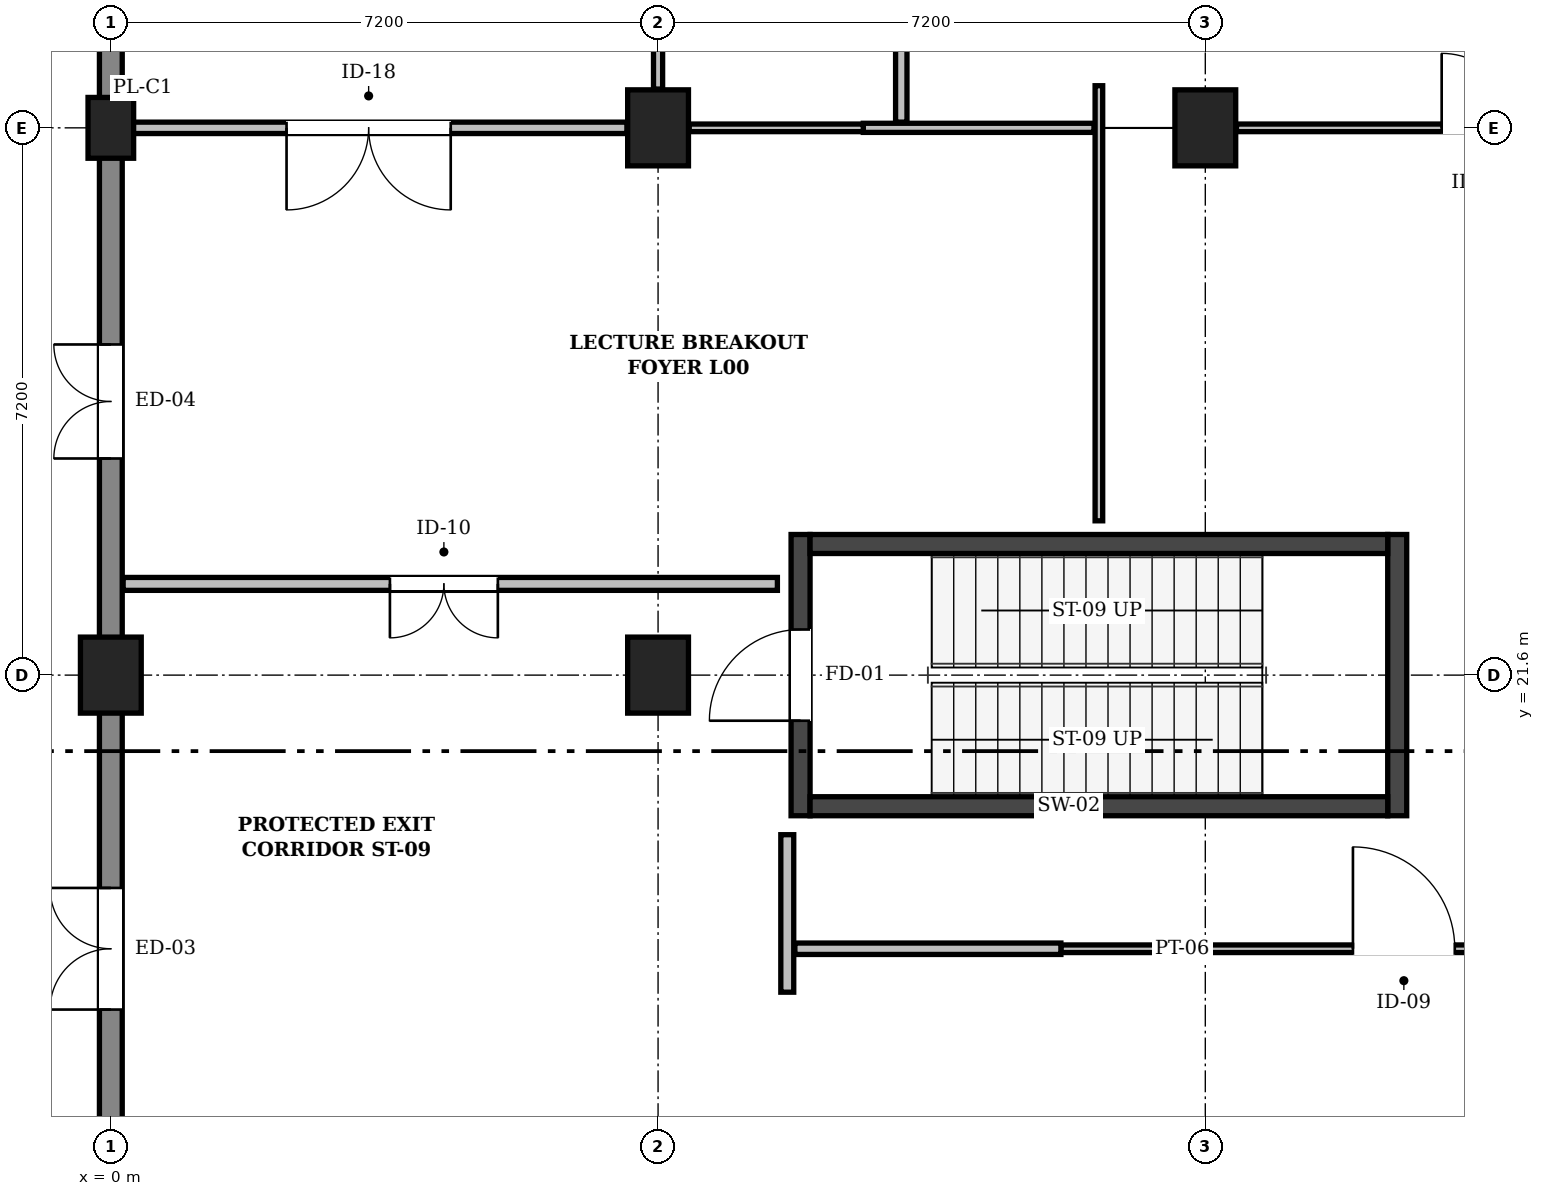
"""IFC4 building model, lengths in metres.
Left out: names, types, materials, properties, quantities, classifications, styles, units other than length and angle.
Written with IfcOpenShell. Run it as: python <this file> out.ifc"""

import sys

from ifc_helpers import new_model, si_unit, direction, frame, frame_2d, origin, origin_2d, place, context, subcontext, project, spatial, rectangle, extrude, element, fill, save


model = new_model("IFC4")
c1 = context("Model", 3, precision=1e-05, world=origin(), true_north=direction((0.0, 1.0)))
c2 = subcontext(c1, "Body", "Model", "MODEL_VIEW")
j1 = project(units=[si_unit("LENGTHUNIT", "METRE"), si_unit("PLANEANGLEUNIT", "RADIAN")], contexts=[c1])
p1 = place(None, origin())
s1 = spatial("IfcSite", under=j1, at=p1, CompositionType="ELEMENT")
p2 = place(p1, origin())
s2 = spatial("IfcBuilding", under=s1, at=p2, CompositionType="ELEMENT")
p3 = place(p2, origin())
s3 = spatial("IfcBuildingStorey", under=s2, at=p3, CompositionType="ELEMENT", Elevation=0.0)
p4 = place(p3, frame((0.0, 21.6, 0.0), z_axis=(0.0, 0.0, 1.0), x_axis=(1.0, 0.0, 0.0)))
e1 = element("IfcColumn", 1, at=p4, inside=s3, PredefinedType="COLUMN", context=c2, shape_type="SweptSolid", body=[
    extrude(rectangle(XDim=0.8, YDim=1.0, at=origin_2d()), origin(), (0.0, 0.0, 1.0), 4.8),
])
p5 = place(p3, frame((0.0, 28.8, 0.0), z_axis=(0.0, 0.062753387879, 0.99802906386), x_axis=(-1.0, 0.0, 0.0)))
e2 = element("IfcColumn", 2, at=p5, inside=s3, PredefinedType="PILASTER", context=c2, shape_type="SweptSolid", body=[
    extrude(rectangle(XDim=0.6, YDim=0.8, at=origin_2d()), origin(), (0.0, 0.0, 1.0), 4.781),
])
for number, where, z_axis, x_axis in (
    (3, (7.2, 21.6, 0.0), (0.0, 0.0, 1.0), (1.0, 0.0, 0.0)),
    (4, (7.2, 28.8, 0.0), (0.0, 0.0, 1.0), (1.0, 0.0, 0.0)),
    (5, (14.4, 28.8, 0.0), (0.0, 0.0, 1.0), (1.0, 0.0, 0.0)),
):
    element("IfcColumn", number, at=place(p3, frame(where, z_axis=z_axis, x_axis=x_axis)), inside=s3, PredefinedType="COLUMN", context=c2, shape_type="SweptSolid", body=[
        extrude(rectangle(XDim=0.8, YDim=1.0, at=origin_2d()), origin(), (0.0, 0.0, 1.0), 4.8),
    ])
p6 = place(p3, frame((0.0, 14.4, 0.0), z_axis=(0.0, 0.0, 1.0), x_axis=(0.0, 1.0, 0.0)))
e6 = element("IfcWall", 6, at=p6, inside=s3, PredefinedType="SOLIDWALL", context=c2, shape_type="SweptSolid", body=[
    extrude(rectangle(XDim=7.2, YDim=0.3, at=frame_2d((3.6, 0.0))), origin(), (0.0, 0.0, 1.0), 4.52),
])
p7 = place(p6, frame((2.8, 0.0, 0.0)))
e7 = element("IfcOpeningElement", 7, at=p7, cuts=e6, PredefinedType="OPENING", context=c2, shape_type="SweptSolid", body=[
    extrude(rectangle(XDim=1.6, YDim=2.2, at=frame_2d((0.8, 1.1))), frame((0.0, 0.162, 0.0), z_axis=(0.0, -1.0, 0.0), x_axis=(1.0, 0.0, 0.0)), (0.0, 0.0, 1.0), 0.324),
])
p8 = place(p3, frame((0.0, 21.6, 0.0), z_axis=(0.0, 0.0, 1.0), x_axis=(0.0, 1.0, 0.0)))
e8 = element("IfcWall", 8, at=p8, inside=s3, PredefinedType="SOLIDWALL", context=c2, shape_type="SweptSolid", body=[
    extrude(rectangle(XDim=7.2, YDim=0.3, at=frame_2d((3.6, 0.0))), origin(), (0.0, 0.0, 1.0), 4.52),
])
p9 = place(p8, frame((2.85, 0.0, 0.0)))
e9 = element("IfcOpeningElement", 9, at=p9, cuts=e8, PredefinedType="OPENING", context=c2, shape_type="SweptSolid", body=[
    extrude(rectangle(XDim=1.5, YDim=2.15, at=frame_2d((0.75, 1.075))), frame((0.0, 0.162, 0.0), z_axis=(0.0, -1.0, 0.0), x_axis=(1.0, 0.0, 0.0)), (0.0, 0.0, 1.0), 0.324),
])
p10 = place(p3, frame((0.0, 29.1, 0.0), z_axis=(0.0, 0.0, 1.0), x_axis=(0.0, 1.0, 0.0)))
e10 = element("IfcWall", 10, at=p10, inside=s3, PredefinedType="SOLIDWALL", context=c2, shape_type="SweptSolid", body=[
    extrude(rectangle(XDim=6.9, YDim=0.3, at=frame_2d((3.45, 0.0))), origin(), (0.0, 0.0, 1.0), 4.52),
])
p11 = place(p10, frame((2.75, 0.0, 0.0)))
e11 = element("IfcOpeningElement", 11, at=p11, cuts=e10, PredefinedType="OPENING", context=c2, shape_type="SweptSolid", body=[
    extrude(rectangle(XDim=1.4, YDim=2.15, at=frame_2d((0.7, 1.075))), frame((0.0, 0.162, 0.0), z_axis=(0.0, -1.0, 0.0), x_axis=(1.0, 0.0, 0.0)), (0.0, 0.0, 1.0), 0.324),
])
p12 = place(p3, frame((9.075, 19.75, 0.0), z_axis=(0.0, 0.0, 1.0), x_axis=(0.0, 1.0, 0.0)))
e12 = element("IfcWall", 12, at=p12, inside=s3, PredefinedType="SHEAR", context=c2, shape_type="SweptSolid", body=[
    extrude(rectangle(XDim=3.7, YDim=0.25, at=frame_2d((1.85, 0.0))), origin(), (0.0, 0.0, 1.0), 4.55),
])
p13 = place(p12, frame((1.25, 0.0, 0.0)))
e13 = element("IfcOpeningElement", 13, at=p13, cuts=e12, PredefinedType="OPENING", context=c2, shape_type="SweptSolid", body=[
    extrude(rectangle(XDim=1.2, YDim=2.15, at=frame_2d((0.6, 1.075))), frame((0.0, 0.137, 0.0), z_axis=(0.0, -1.0, 0.0), x_axis=(1.0, 0.0, 0.0)), (0.0, 0.0, 1.0), 0.274),
])
p14 = place(p3, frame((16.925, 19.75, 0.0), z_axis=(0.0, 0.0, 1.0), x_axis=(0.0, 1.0, 0.0)))
e14 = element("IfcWall", 14, at=p14, inside=s3, PredefinedType="SHEAR", context=c2, shape_type="SweptSolid", body=[
    extrude(rectangle(XDim=3.7, YDim=0.25, at=frame_2d((1.85, 0.0))), origin(), (0.0, 0.0, 1.0), 4.55),
])
for number, where, z_axis, x_axis in (
    (15, (9.2, 19.875, 0.0), (0.0, 0.0, 1.0), (1.0, 0.0, 0.0)),
    (16, (9.2, 23.325, 0.0), (0.0, 0.0, 1.0), (1.0, 0.0, 0.0)),
):
    element("IfcWall", number, at=place(p3, frame(where, z_axis=z_axis, x_axis=x_axis)), inside=s3, PredefinedType="SHEAR", context=c2, shape_type="SweptSolid", body=[
        extrude(rectangle(XDim=7.6, YDim=0.25, at=frame_2d((3.8, 0.0))), origin(), (0.0, 0.0, 1.0), 4.55),
    ])
p15 = place(p3, frame((0.162, 22.8, 0.0), z_axis=(0.0, 0.0, 1.0), x_axis=(1.0, 0.0, 0.0)))
e17 = element("IfcWall", 17, at=p15, inside=s3, PredefinedType="PARTITIONING", context=c2, shape_type="SweptSolid", body=[
    extrude(rectangle(XDim=8.608, YDim=0.17, at=frame_2d((4.304, 0.0))), origin(), (0.0, 0.0, 1.0), 4.46),
])
p16 = place(p15, frame((3.51, 0.0, 0.0)))
e18 = element("IfcOpeningElement", 18, at=p16, cuts=e17, PredefinedType="OPENING", context=c2, shape_type="SweptSolid", body=[
    extrude(rectangle(XDim=1.42, YDim=2.24, at=frame_2d((0.71, 1.12))), frame((0.0, 0.097, 0.0), z_axis=(0.0, -1.0, 0.0), x_axis=(1.0, 0.0, 0.0)), (0.0, 0.0, 1.0), 0.194),
])
p17 = place(p3, frame((8.9, 17.428, 0.0), z_axis=(0.0, 0.0, 1.0), x_axis=(0.0, 1.0, 0.0)))
e19 = element("IfcWall", 19, at=p17, inside=s3, PredefinedType="PARTITIONING", context=c2, shape_type="SweptSolid", body=[
    extrude(rectangle(XDim=2.072, YDim=0.17, at=frame_2d((1.036, 0.0))), origin(), (0.0, 0.0, 1.0), 4.46),
])
p18 = place(p3, frame((12.5, 18.0, 0.0), z_axis=(0.0, 0.0, 1.0), x_axis=(1.0, 0.0, 0.0)))
e20 = element("IfcWall", 20, at=p18, inside=s3, PredefinedType="PARTITIONING", context=c2, shape_type="SweptSolid", body=[
    extrude(rectangle(XDim=9.025, YDim=0.1, at=frame_2d((4.512, 0.0))), origin(), (0.0, 0.0, 1.0), 4.46),
])
p19 = place(p18, frame((3.843, 0.0, 0.0)))
e21 = element("IfcOpeningElement", 21, at=p19, cuts=e20, PredefinedType="OPENING", context=c2, shape_type="SweptSolid", body=[
    extrude(rectangle(XDim=1.34, YDim=2.24, at=frame_2d((0.67, 1.12))), frame((0.0, 0.062, 0.0), z_axis=(0.0, -1.0, 0.0), x_axis=(1.0, 0.0, 0.0)), (0.0, 0.0, 1.0), 0.124),
])
p20 = place(p3, frame((9.0, 18.0, 0.0), z_axis=(0.0, 0.0, 1.0), x_axis=(1.0, 0.0, 0.0)))
e22 = element("IfcWall", 22, at=p20, inside=s3, PredefinedType="PARTITIONING", context=c2, shape_type="SweptSolid", body=[
    extrude(rectangle(XDim=3.5, YDim=0.15, at=frame_2d((1.75, 0.0))), origin(), (0.0, 0.0, 1.0), 4.46),
])
p21 = place(p3, frame((13.0, 23.63, 0.0), z_axis=(0.0, 0.0, 1.0), x_axis=(0.0, 1.0, 0.0)))
e23 = element("IfcWall", 23, at=p21, inside=s3, PredefinedType="PARTITIONING", context=c2, shape_type="SweptSolid", body=[
    extrude(rectangle(XDim=5.724, YDim=0.1, at=frame_2d((2.862, 0.0))), origin(), (0.0, 0.0, 1.0), 4.46),
])
p22 = place(p3, frame((14.81, 28.8, 0.0), z_axis=(0.0, 0.0, 1.0), x_axis=(1.0, 0.0, 0.0)))
e24 = element("IfcWall", 24, at=p22, inside=s3, PredefinedType="PARTITIONING", context=c2, shape_type="SweptSolid", body=[
    extrude(rectangle(XDim=6.38, YDim=0.1, at=frame_2d((3.19, 0.0))), origin(), (0.0, 0.0, 1.0), 3.83),
])
p23 = place(p22, frame((2.7, 0.0, 0.0)))
e25 = element("IfcOpeningElement", 25, at=p23, cuts=e24, PredefinedType="OPENING", context=c2, shape_type="SweptSolid", body=[
    extrude(rectangle(XDim=0.98, YDim=2.14, at=frame_2d((0.49, 1.07))), frame((0.0, 0.062, 0.0), z_axis=(0.0, -1.0, 0.0), x_axis=(1.0, 0.0, 0.0)), (0.0, 0.0, 1.0), 0.124),
])
p24 = place(p3, frame((0.162, 28.8, 0.0), z_axis=(0.0, 0.0, 1.0), x_axis=(1.0, 0.0, 0.0)))
e26 = element("IfcWall", 26, at=p24, inside=s3, PredefinedType="PARTITIONING", context=c2, shape_type="SweptSolid", body=[
    extrude(rectangle(XDim=6.628, YDim=0.15, at=frame_2d((3.314, 0.0))), origin(), (0.0, 0.0, 1.0), 3.83),
])
p25 = place(p24, frame((2.15, 0.0, 0.0)))
e27 = element("IfcOpeningElement", 27, at=p25, cuts=e26, PredefinedType="OPENING", context=c2, shape_type="SweptSolid", body=[
    extrude(rectangle(XDim=2.16, YDim=2.35, at=frame_2d((1.08, 1.175))), frame((0.0, 0.087, 0.0), z_axis=(0.0, -1.0, 0.0), x_axis=(1.0, 0.0, 0.0)), (0.0, 0.0, 1.0), 0.174),
])
p26 = place(p3, frame((9.9, 28.8, 0.0), z_axis=(0.0, 0.0, 1.0), x_axis=(1.0, 0.0, 0.0)))
e28 = element("IfcWall", 28, at=p26, inside=s3, PredefinedType="PARTITIONING", context=c2, shape_type="SweptSolid", body=[
    extrude(rectangle(XDim=3.035, YDim=0.12, at=frame_2d((1.518, 0.0))), origin(), (0.0, 0.0, 1.0), 3.83),
])
p27 = place(p3, frame((7.61, 28.8, 0.0), z_axis=(0.0, 0.0, 1.0), x_axis=(1.0, 0.0, 0.0)))
e29 = element("IfcWall", 29, at=p27, inside=s3, PredefinedType="PARTITIONING", context=c2, shape_type="SweptSolid", body=[
    extrude(rectangle(XDim=2.29, YDim=0.1, at=frame_2d((1.145, 0.0))), origin(), (0.0, 0.0, 1.0), 3.83),
])
p28 = place(p3, frame((7.2, 29.31, 0.0), z_axis=(0.0, 0.0, 1.0), x_axis=(0.0, 1.0, 0.0)))
e30 = element("IfcWall", 30, at=p28, inside=s3, PredefinedType="PARTITIONING", context=c2, shape_type="SweptSolid", body=[
    extrude(rectangle(XDim=6.205, YDim=0.12, at=frame_2d((3.103, 0.0))), origin(), (0.0, 0.0, 1.0), 4.08),
])
p29 = place(p3, frame((10.4, 28.875, 0.0), z_axis=(0.0, 0.0, 1.0), x_axis=(0.0, 1.0, 0.0)))
e31 = element("IfcWall", 31, at=p29, inside=s3, PredefinedType="PARTITIONING", context=c2, shape_type="SweptSolid", body=[
    extrude(rectangle(XDim=7.145, YDim=0.15, at=frame_2d((3.573, 0.0))), origin(), (0.0, 0.0, 1.0), 4.46),
])
p30 = place(p7, origin())
e32 = element("IfcDoor", 32, at=p30, inside=s3, OperationType="DOUBLE_DOOR_SINGLE_SWING", PredefinedType="DOOR", context=c2, shape_type="SweptSolid", body=[
    extrude(rectangle(XDim=1.6, YDim=2.2, at=frame_2d((0.8, 1.1))), frame((0.0, 0.025, 0.0), z_axis=(0.0, -1.0, 0.0), x_axis=(1.0, 0.0, 0.0)), (0.0, 0.0, 1.0), 0.05),
])
fill(e7, e32)
p31 = place(p9, origin())
e33 = element("IfcDoor", 33, at=p31, inside=s3, OperationType="DOUBLE_DOOR_SINGLE_SWING", PredefinedType="DOOR", context=c2, shape_type="SweptSolid", body=[
    extrude(rectangle(XDim=1.5, YDim=2.15, at=frame_2d((0.75, 1.075))), frame((0.0, 0.025, 0.0), z_axis=(0.0, -1.0, 0.0), x_axis=(1.0, 0.0, 0.0)), (0.0, 0.0, 1.0), 0.05),
])
fill(e9, e33)
p32 = place(p13, origin())
e34 = element("IfcDoor", 34, at=p32, inside=s3, OperationType="SINGLE_SWING_LEFT", PredefinedType="DOOR", context=c2, shape_type="SweptSolid", body=[
    extrude(rectangle(XDim=1.2, YDim=2.15, at=frame_2d((0.6, 1.075))), frame((0.0, 0.025, 0.0), z_axis=(0.0, -1.0, 0.0), x_axis=(1.0, 0.0, 0.0)), (0.0, 0.0, 1.0), 0.05),
])
fill(e13, e34)
p33 = place(p19, origin())
e35 = element("IfcDoor", 35, at=p33, inside=s3, OperationType="SINGLE_SWING_LEFT", PredefinedType="DOOR", context=c2, shape_type="SweptSolid", body=[
    extrude(rectangle(XDim=1.34, YDim=2.24, at=frame_2d((0.67, 1.12))), frame((0.0, 0.025, 0.0), z_axis=(0.0, -1.0, 0.0), x_axis=(1.0, 0.0, 0.0)), (0.0, 0.0, 1.0), 0.05),
])
fill(e21, e35)
p34 = place(p16, frame((1.42, 0.0, 0.0), z_axis=(0.0, 0.0, 1.0), x_axis=(-1.0, 0.0, 0.0)))
e36 = element("IfcDoor", 36, at=p34, inside=s3, OperationType="DOUBLE_DOOR_SINGLE_SWING", PredefinedType="DOOR", context=c2, shape_type="SweptSolid", body=[
    extrude(rectangle(XDim=1.42, YDim=2.24, at=frame_2d((0.71, 1.12))), frame((0.0, 0.025, 0.0), z_axis=(0.0, -1.0, 0.0), x_axis=(1.0, 0.0, 0.0)), (0.0, 0.0, 1.0), 0.05),
])
fill(e18, e36)
p35 = place(p25, frame((2.16, 0.0, 0.0), z_axis=(0.0, 0.0, 1.0), x_axis=(-1.0, 0.0, 0.0)))
e37 = element("IfcDoor", 37, at=p35, inside=s3, OperationType="DOUBLE_DOOR_SINGLE_SWING", PredefinedType="DOOR", context=c2, shape_type="SweptSolid", body=[
    extrude(rectangle(XDim=2.16, YDim=2.35, at=frame_2d((1.08, 1.175))), frame((0.0, 0.025, 0.0), z_axis=(0.0, -1.0, 0.0), x_axis=(1.0, 0.0, 0.0)), (0.0, 0.0, 1.0), 0.05),
])
fill(e27, e37)
p36 = place(p23, origin())
e38 = element("IfcDoor", 38, at=p36, inside=s3, OperationType="SINGLE_SWING_LEFT", PredefinedType="DOOR", context=c2, shape_type="SweptSolid", body=[
    extrude(rectangle(XDim=0.98, YDim=2.14, at=frame_2d((0.49, 1.07))), frame((0.0, 0.025, 0.0), z_axis=(0.0, -1.0, 0.0), x_axis=(1.0, 0.0, 0.0)), (0.0, 0.0, 1.0), 0.05),
])
fill(e25, e38)
save(model, sys.argv[1])
